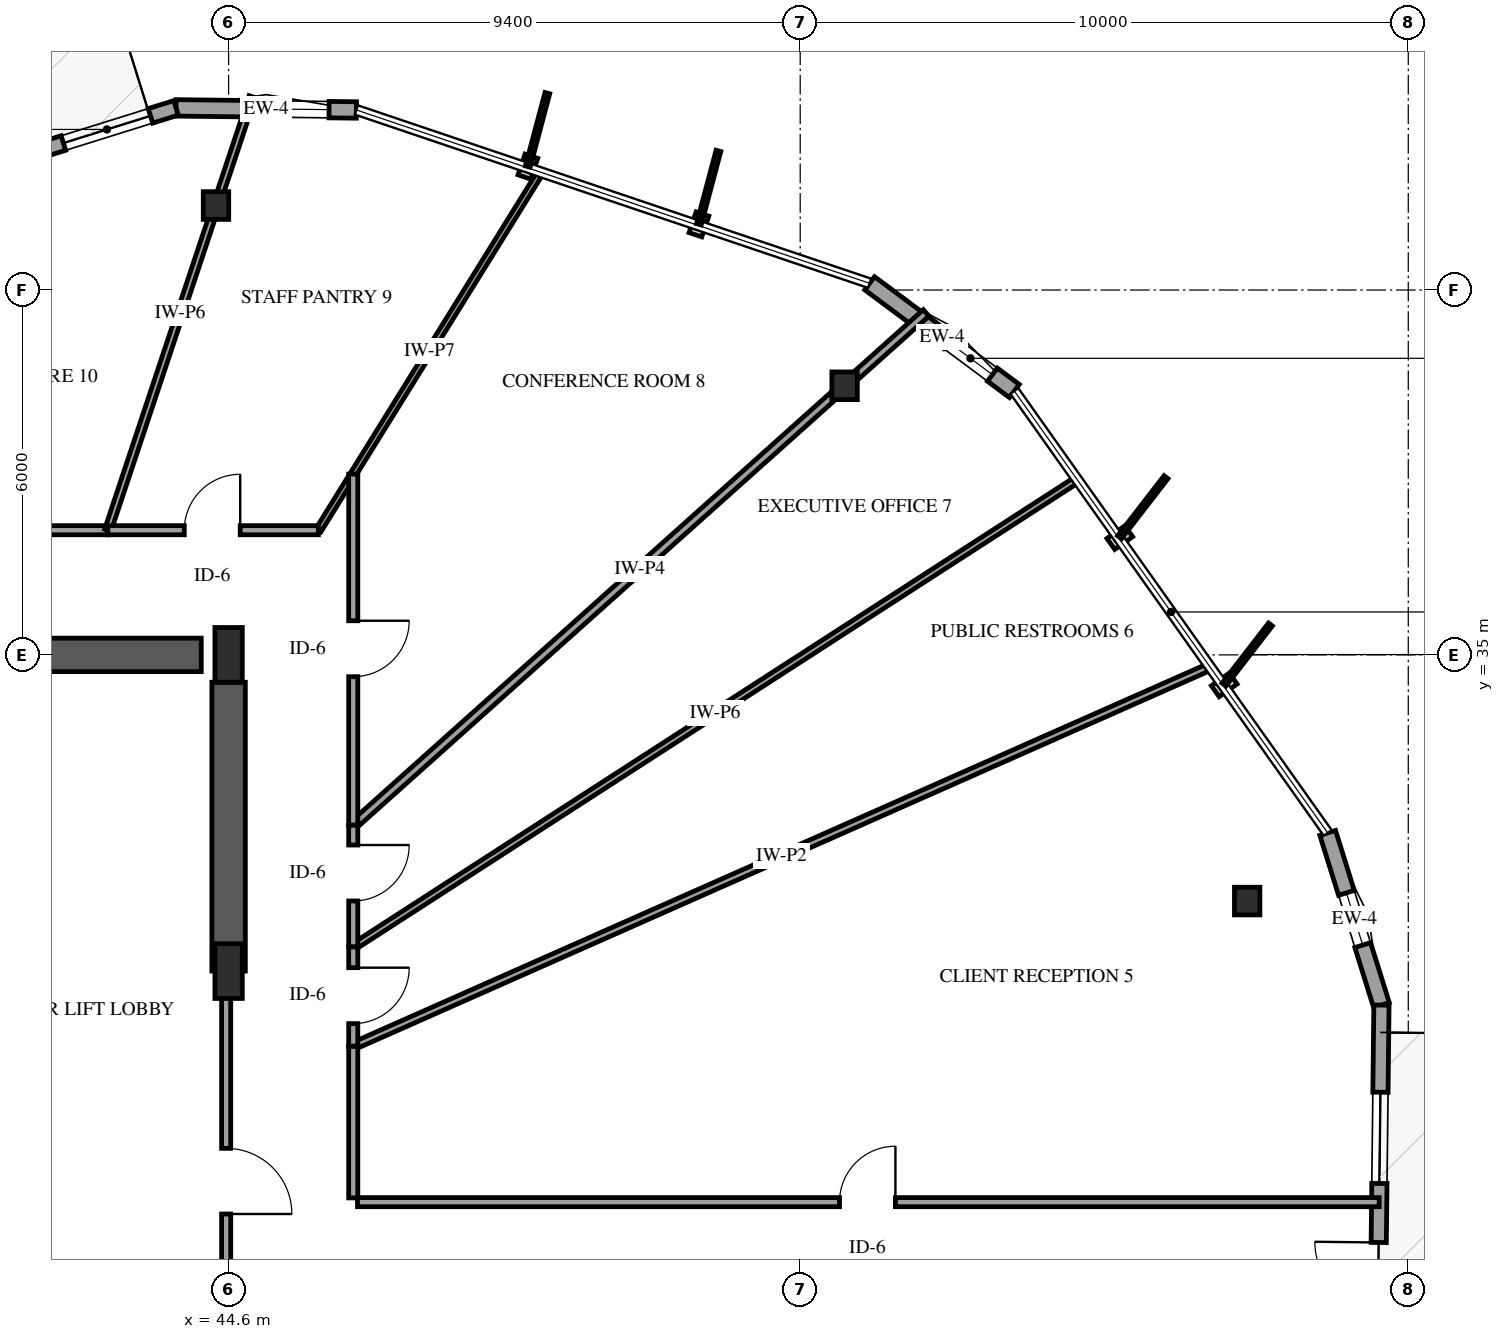
"""IFC4 building model, lengths in metres.
Left out: names, types, materials, properties, quantities, classifications, styles, units other than length and angle.
Written with IfcOpenShell. Run it as: python <this file> out.ifc"""

import sys

from ifc_helpers import new_model, si_unit, direction, frame, frame_2d, origin, origin_2d, place, context, subcontext, project, spatial, rectangle, i_section, extrude, element, fill, save


model = new_model("IFC4")
c1 = context("Model", 3, precision=1e-05, world=origin(), true_north=direction((0.0, 1.0)))
c2 = subcontext(c1, "Body", "Model", "MODEL_VIEW")
j1 = project(units=[si_unit("LENGTHUNIT", "METRE"), si_unit("PLANEANGLEUNIT", "RADIAN")], contexts=[c1])
p1 = place(None, origin())
s1 = spatial("IfcSite", under=j1, at=p1, CompositionType="ELEMENT")
p2 = place(p1, origin())
s2 = spatial("IfcBuilding", under=s1, at=p2, CompositionType="ELEMENT")
p3 = place(p2, frame((0.0, 0.0, 95.2)))
s3 = spatial("IfcBuildingStorey", under=s2, at=p3, CompositionType="ELEMENT", Elevation=95.2)
p4 = place(p3, frame((41.3, 35.0, 0.0), z_axis=(0.0, 0.0, 1.0), x_axis=(1.0, 0.0, 0.0)))
e1 = element("IfcWall", 1, at=p4, inside=s3, PredefinedType="SHEAR", context=c2, shape_type="SweptSolid", body=[
    extrude(rectangle(XDim=2.85, YDim=0.55, at=frame_2d((1.425, 0.0))), origin(), (0.0, 0.0, 1.0), 3.9),
])
p5 = place(p3, frame((44.6, 29.8, 0.0), z_axis=(0.0, 0.0, 1.0), x_axis=(0.0, 1.0, 0.0)))
e2 = element("IfcWall", 2, at=p5, inside=s3, PredefinedType="SHEAR", context=c2, shape_type="SweptSolid", body=[
    extrude(rectangle(XDim=4.75, YDim=0.55, at=frame_2d((2.375, 0.0))), origin(), (0.0, 0.0, 1.0), 3.9),
])
for number, where, z_axis, x_axis in (
    (3, (44.6, 29.8, 0.0), (0.0, 0.0, 1.0), (1.0, 0.0, 0.0)),
    (4, (44.6, 35.0, 0.0), (0.0, 0.0, 1.0), (1.0, 0.0, 0.0)),
):
    element("IfcColumn", number, at=place(p3, frame(where, z_axis=z_axis, x_axis=x_axis)), inside=s3, PredefinedType="PILASTER", context=c2, shape_type="SweptSolid", body=[
        extrude(rectangle(XDim=0.45, YDim=0.9, at=origin_2d()), origin(), (0.0, 0.0, 1.0), 3.9),
    ])
for number, where, z_axis, x_axis in (
    (5, (61.351, 30.951, 0.0), (0.0, 0.0, 1.0), (1.0, 0.0, 0.0)),
    (6, (54.73, 39.425, 0.0), (0.0, 0.0, 1.0), (1.0, 0.0, 0.0)),
    (7, (44.393, 42.389, 0.0), (0.0, 0.0, 1.0), (1.0, 0.0, 0.0)),
):
    element("IfcColumn", number, at=place(p3, frame(where, z_axis=z_axis, x_axis=x_axis)), inside=s3, PredefinedType="COLUMN", context=c2, shape_type="SweptSolid", body=[
        extrude(i_section(OverallWidth=0.418, OverallDepth=0.455, WebThickness=0.042, FlangeThickness=0.068, FilletRadius=0.038, at=origin_2d()), origin(), (0.0, 0.0, 1.0), 3.9),
    ])
p6 = place(p3, frame((57.522, 39.34, 0.0), z_axis=(0.0, 0.0, 1.0), x_axis=(-0.802216720069, 0.597032942175, 0.0)))
e8 = element("IfcWall", 8, at=p6, inside=s3, PredefinedType="SOLIDWALL", context=c2, shape_type="SweptSolid", body=[
    extrude(rectangle(XDim=2.966, YDim=0.27, at=frame_2d((1.483, 0.0))), origin(), (0.0, 0.0, 1.0), 2.979),
])
p7 = place(p6, frame((0.45, 0.0, 0.75)))
e9 = element("IfcOpeningElement", 9, at=p7, cuts=e8, PredefinedType="OPENING", context=c2, shape_type="SweptSolid", body=[
    extrude(rectangle(XDim=0.9, YDim=1.5, at=frame_2d((0.45, 0.75))), frame((0.0, 0.145, 0.0), z_axis=(0.0, -1.0, 0.0), x_axis=(1.0, 0.0, 0.0)), (0.0, 0.0, 1.0), 0.29),
])
p8 = place(p3, frame((46.702, 43.961, 0.0), z_axis=(0.0, 0.0, 1.0), x_axis=(-0.99993363199, 0.011520920787, 0.0)))
e10 = element("IfcWall", 10, at=p8, inside=s3, PredefinedType="SOLIDWALL", context=c2, shape_type="SweptSolid", body=[
    extrude(rectangle(XDim=2.967, YDim=0.27, at=frame_2d((1.483, 0.0))), origin(), (0.0, 0.0, 1.0), 2.979),
])
p9 = place(p8, frame((0.45, 0.0, 0.75)))
e11 = element("IfcOpeningElement", 11, at=p9, cuts=e10, PredefinedType="OPENING", context=c2, shape_type="SweptSolid", body=[
    extrude(rectangle(XDim=0.9, YDim=1.5, at=frame_2d((0.45, 0.75))), frame((0.0, 0.145, 0.0), z_axis=(0.0, -1.0, 0.0), x_axis=(1.0, 0.0, 0.0)), (0.0, 0.0, 1.0), 0.29),
])
p10 = place(p3, frame((43.735, 43.995, 0.0), z_axis=(0.0, 0.0, 1.0), x_axis=(-0.954555531523, -0.298033114332, 0.0)))
e12 = element("IfcWall", 12, at=p10, inside=s3, PredefinedType="SOLIDWALL", context=c2, shape_type="SweptSolid", body=[
    extrude(rectangle(XDim=8.908, YDim=0.25, at=frame_2d((4.454, 0.0))), origin(), (0.0, 0.0, 1.0), 2.979),
])
p11 = place(p10, frame((3.954, 0.0, 0.0)))
e13 = element("IfcOpeningElement", 13, at=p11, cuts=e12, PredefinedType="OPENING", context=c2, shape_type="SweptSolid", body=[
    extrude(rectangle(XDim=1.05, YDim=2.15, at=frame_2d((0.525, 1.075))), frame((0.0, 0.135, 0.0), z_axis=(0.0, -1.0, 0.0), x_axis=(1.0, 0.0, 0.0)), (0.0, 0.0, 1.0), 0.27),
])
p12 = place(p10, frame((0.44, 0.0, 0.72)))
e14 = element("IfcOpeningElement", 14, at=p12, cuts=e12, PredefinedType="OPENING", context=c2, shape_type="SweptSolid", body=[
    extrude(rectangle(XDim=1.5, YDim=1.7, at=frame_2d((0.75, 0.85))), frame((0.0, 0.135, 0.0), z_axis=(0.0, -1.0, 0.0), x_axis=(1.0, 0.0, 0.0)), (0.0, 0.0, 1.0), 0.27),
])
p13 = place(p10, frame((5.644, 0.0, 0.72)))
e15 = element("IfcOpeningElement", 15, at=p13, cuts=e12, PredefinedType="OPENING", context=c2, shape_type="SweptSolid", body=[
    extrude(rectangle(XDim=1.5, YDim=1.7, at=frame_2d((0.75, 0.85))), frame((0.0, 0.135, 0.0), z_axis=(0.0, -1.0, 0.0), x_axis=(1.0, 0.0, 0.0)), (0.0, 0.0, 1.0), 0.27),
])
p14 = place(p3, frame((63.559, 29.241, 0.0), z_axis=(0.0, 0.0, 1.0), x_axis=(-0.297998508568, 0.954566335511, 0.0)))
e16 = element("IfcWall", 16, at=p14, inside=s3, PredefinedType="SOLIDWALL", context=c2, shape_type="SweptSolid", body=[
    extrude(rectangle(XDim=2.967, YDim=0.27, at=frame_2d((1.483, 0.0))), origin(), (0.0, 0.0, 1.0), 2.979),
])
p15 = place(p14, frame((1.033, 0.0, 0.75)))
e17 = element("IfcOpeningElement", 17, at=p15, cuts=e16, PredefinedType="OPENING", context=c2, shape_type="SweptSolid", body=[
    extrude(rectangle(XDim=0.9, YDim=1.5, at=frame_2d((0.45, 0.75))), frame((0.0, 0.145, 0.0), z_axis=(0.0, -1.0, 0.0), x_axis=(1.0, 0.0, 0.0)), (0.0, 0.0, 1.0), 0.29),
])
p16 = place(p3, frame((63.456, 20.333, 0.0), z_axis=(0.0, 0.0, 1.0), x_axis=(0.011510186569, 0.999933755608, 0.0)))
e18 = element("IfcWall", 18, at=p16, inside=s3, PredefinedType="SOLIDWALL", context=c2, shape_type="SweptSolid", body=[
    extrude(rectangle(XDim=8.908, YDim=0.25, at=frame_2d((4.454, 0.0))), origin(), (0.0, 0.0, 1.0), 2.979),
])
p17 = place(p16, frame((3.954, 0.0, 0.0)))
e19 = element("IfcOpeningElement", 19, at=p17, cuts=e18, PredefinedType="OPENING", context=c2, shape_type="SweptSolid", body=[
    extrude(rectangle(XDim=1.05, YDim=2.15, at=frame_2d((0.525, 1.075))), frame((0.0, 0.135, 0.0), z_axis=(0.0, -1.0, 0.0), x_axis=(1.0, 0.0, 0.0)), (0.0, 0.0, 1.0), 0.27),
])
p18 = place(p16, frame((0.44, 0.0, 0.72)))
e20 = element("IfcOpeningElement", 20, at=p18, cuts=e18, PredefinedType="OPENING", context=c2, shape_type="SweptSolid", body=[
    extrude(rectangle(XDim=1.5, YDim=1.7, at=frame_2d((0.75, 0.85))), frame((0.0, 0.135, 0.0), z_axis=(0.0, -1.0, 0.0), x_axis=(1.0, 0.0, 0.0)), (0.0, 0.0, 1.0), 0.27),
])
p19 = place(p16, frame((5.975, 0.0, 0.72)))
e21 = element("IfcOpeningElement", 21, at=p19, cuts=e18, PredefinedType="OPENING", context=c2, shape_type="SweptSolid", body=[
    extrude(rectangle(XDim=1.5, YDim=1.7, at=frame_2d((0.75, 0.85))), frame((0.0, 0.135, 0.0), z_axis=(0.0, -1.0, 0.0), x_axis=(1.0, 0.0, 0.0)), (0.0, 0.0, 1.0), 0.27),
])
p20 = place(p3, frame((46.72, 26.0, 0.0), z_axis=(0.0, 0.0, 1.0), x_axis=(1.0, 0.0, 0.0)))
e22 = element("IfcWall", 22, at=p20, inside=s3, PredefinedType="PARTITIONING", context=c2, shape_type="SweptSolid", body=[
    extrude(rectangle(XDim=16.802, YDim=0.15, at=frame_2d((8.401, 0.0))), origin(), (0.0, 0.0, 1.0), 3.6),
])
p21 = place(p20, frame((7.926, 0.0, 0.0)))
e23 = element("IfcOpeningElement", 23, at=p21, cuts=e22, PredefinedType="OPENING", context=c2, shape_type="SweptSolid", body=[
    extrude(rectangle(XDim=0.92, YDim=2.12, at=frame_2d((0.46, 1.06))), frame((0.0, 0.085, 0.0), z_axis=(0.0, -1.0, 0.0), x_axis=(1.0, 0.0, 0.0)), (0.0, 0.0, 1.0), 0.17),
])
p22 = place(p3, frame((46.65, 28.566, 0.0), z_axis=(0.0, 0.0, 1.0), x_axis=(0.91433941556, 0.404948679653, 0.0)))
e24 = element("IfcWall", 24, at=p22, inside=s3, PredefinedType="PARTITIONING", context=c2, shape_type="SweptSolid", body=[
    extrude(rectangle(XDim=15.407, YDim=0.12, at=frame_2d((7.704, 0.0))), origin(), (0.0, 0.0, 1.0), 3.6),
])
p23 = place(p3, frame((46.65, 30.197, 0.0), z_axis=(0.0, 0.0, 1.0), x_axis=(0.840103662717, 0.542425880549, 0.0)))
e25 = element("IfcWall", 25, at=p23, inside=s3, PredefinedType="PARTITIONING", context=c2, shape_type="SweptSolid", body=[
    extrude(rectangle(XDim=14.17, YDim=0.11, at=frame_2d((7.085, 0.0))), origin(), (0.0, 0.0, 1.0), 3.6),
])
p24 = place(p3, frame((46.65, 32.199, 0.0), z_axis=(0.0, 0.0, 1.0), x_axis=(0.745414069406, 0.666601729019, 0.0)))
e26 = element("IfcWall", 26, at=p24, inside=s3, PredefinedType="PARTITIONING", context=c2, shape_type="SweptSolid", body=[
    extrude(rectangle(XDim=12.639, YDim=0.14, at=frame_2d((6.319, 0.0))), origin(), (0.0, 0.0, 1.0), 2.978),
])
p25 = place(p3, frame((34.81, 37.05, 0.0), z_axis=(0.0, 0.0, 1.0), x_axis=(1.0, 0.0, 0.0)))
e27 = element("IfcWall", 27, at=p25, inside=s3, PredefinedType="PARTITIONING", context=c2, shape_type="SweptSolid", body=[
    extrude(rectangle(XDim=7.804, YDim=0.15, at=frame_2d((3.902, 0.0))), origin(), (0.0, 0.0, 1.0), 3.6),
])
p26 = place(p25, frame((3.427, 0.0, 0.0)))
e28 = element("IfcOpeningElement", 28, at=p26, cuts=e27, PredefinedType="OPENING", context=c2, shape_type="SweptSolid", body=[
    extrude(rectangle(XDim=0.92, YDim=2.12, at=frame_2d((0.46, 1.06))), frame((0.0, 0.085, 0.0), z_axis=(0.0, -1.0, 0.0), x_axis=(1.0, 0.0, 0.0)), (0.0, 0.0, 1.0), 0.17),
])
p27 = place(p3, frame((42.614, 37.05, 0.0), z_axis=(0.0, 0.0, 1.0), x_axis=(0.316071805261, 0.948735270726, 0.0)))
e29 = element("IfcWall", 29, at=p27, inside=s3, PredefinedType="PARTITIONING", context=c2, shape_type="SweptSolid", body=[
    extrude(rectangle(XDim=7.514, YDim=0.11, at=frame_2d((3.757, 0.0))), origin(), (0.0, 0.0, 1.0), 2.895),
])
p28 = place(p3, frame((46.077, 37.05, 0.0), z_axis=(0.0, 0.0, 1.0), x_axis=(0.527307609439, 0.849674458265, 0.0)))
e30 = element("IfcWall", 30, at=p28, inside=s3, PredefinedType="PARTITIONING", context=c2, shape_type="SweptSolid", body=[
    extrude(rectangle(XDim=6.93, YDim=0.1, at=frame_2d((3.465, 0.0))), origin(), (0.0, 0.0, 1.0), 3.6),
])
p29 = place(p3, frame((44.56, 29.8, 0.0), z_axis=(0.0, 0.0, 1.0), x_axis=(0.0, -1.0, 0.0)))
e31 = element("IfcWall", 31, at=p29, inside=s3, PredefinedType="PARTITIONING", context=c2, shape_type="SweptSolid", body=[
    extrude(rectangle(XDim=6.91, YDim=0.15, at=frame_2d((3.455, 0.0))), origin(), (0.0, 0.0, 1.0), 2.64),
])
p30 = place(p29, frame((2.915, 0.0, 0.0)))
e32 = element("IfcOpeningElement", 32, at=p30, cuts=e31, PredefinedType="OPENING", context=c2, shape_type="SweptSolid", body=[
    extrude(rectangle(XDim=1.08, YDim=2.15, at=frame_2d((0.54, 1.075))), frame((0.0, 0.085, 0.0), z_axis=(0.0, -1.0, 0.0), x_axis=(1.0, 0.0, 0.0)), (0.0, 0.0, 1.0), 0.17),
])
p31 = place(p3, frame((46.65, 37.973, 0.0), z_axis=(0.0, 0.0, 1.0), x_axis=(0.0, -1.0, 0.0)))
e33 = element("IfcWall", 33, at=p31, inside=s3, PredefinedType="PARTITIONING", context=c2, shape_type="SweptSolid", body=[
    extrude(rectangle(XDim=5.774, YDim=0.15, at=frame_2d((2.887, 0.0))), origin(), (0.0, 0.0, 1.0), 3.6),
])
p32 = place(p31, frame((2.412, 0.0, 0.0)))
e34 = element("IfcOpeningElement", 34, at=p32, cuts=e33, PredefinedType="OPENING", context=c2, shape_type="SweptSolid", body=[
    extrude(rectangle(XDim=0.92, YDim=2.12, at=frame_2d((0.46, 1.06))), frame((0.0, 0.085, 0.0), z_axis=(0.0, -1.0, 0.0), x_axis=(1.0, 0.0, 0.0)), (0.0, 0.0, 1.0), 0.17),
])
p33 = place(p3, frame((42.614, 37.05, 0.0), z_axis=(0.0, 0.0, 1.0), x_axis=(1.0, 0.0, 0.0)))
e35 = element("IfcWall", 35, at=p33, inside=s3, PredefinedType="PARTITIONING", context=c2, shape_type="SweptSolid", body=[
    extrude(rectangle(XDim=3.463, YDim=0.15, at=frame_2d((1.731, 0.0))), origin(), (0.0, 0.0, 1.0), 3.6),
])
p34 = place(p33, frame((1.257, 0.0, 0.0)))
e36 = element("IfcOpeningElement", 36, at=p34, cuts=e35, PredefinedType="OPENING", context=c2, shape_type="SweptSolid", body=[
    extrude(rectangle(XDim=0.92, YDim=2.12, at=frame_2d((0.46, 1.06))), frame((0.0, 0.085, 0.0), z_axis=(0.0, -1.0, 0.0), x_axis=(1.0, 0.0, 0.0)), (0.0, 0.0, 1.0), 0.17),
])
p35 = place(p3, frame((46.65, 28.566, 0.0), z_axis=(0.0, 0.0, 1.0), x_axis=(0.0, -1.0, 0.0)))
e37 = element("IfcWall", 37, at=p35, inside=s3, PredefinedType="PARTITIONING", context=c2, shape_type="SweptSolid", body=[
    extrude(rectangle(XDim=2.496, YDim=0.15, at=frame_2d((1.248, 0.0))), origin(), (0.0, 0.0, 1.0), 3.6),
])
p36 = place(p3, frame((46.65, 32.199, 0.0), z_axis=(0.0, 0.0, 1.0), x_axis=(0.0, -1.0, 0.0)))
e38 = element("IfcWall", 38, at=p36, inside=s3, PredefinedType="PARTITIONING", context=c2, shape_type="SweptSolid", body=[
    extrude(rectangle(XDim=2.002, YDim=0.15, at=frame_2d((1.001, 0.0))), origin(), (0.0, 0.0, 1.0), 3.6),
])
p37 = place(p36, frame((0.326, 0.0, 0.0)))
e39 = element("IfcOpeningElement", 39, at=p37, cuts=e38, PredefinedType="OPENING", context=c2, shape_type="SweptSolid", body=[
    extrude(rectangle(XDim=0.92, YDim=2.12, at=frame_2d((0.46, 1.06))), frame((0.0, 0.085, 0.0), z_axis=(0.0, -1.0, 0.0), x_axis=(1.0, 0.0, 0.0)), (0.0, 0.0, 1.0), 0.17),
])
p38 = place(p3, frame((46.65, 30.197, 0.0), z_axis=(0.0, 0.0, 1.0), x_axis=(0.0, -1.0, 0.0)))
e40 = element("IfcWall", 40, at=p38, inside=s3, PredefinedType="PARTITIONING", context=c2, shape_type="SweptSolid", body=[
    extrude(rectangle(XDim=1.631, YDim=0.15, at=frame_2d((0.815, 0.0))), origin(), (0.0, 0.0, 1.0), 3.6),
])
p39 = place(p38, frame((0.341, 0.0, 0.0)))
e41 = element("IfcOpeningElement", 41, at=p39, cuts=e40, PredefinedType="OPENING", context=c2, shape_type="SweptSolid", body=[
    extrude(rectangle(XDim=0.92, YDim=2.12, at=frame_2d((0.46, 1.06))), frame((0.0, 0.085, 0.0), z_axis=(0.0, -1.0, 0.0), x_axis=(1.0, 0.0, 0.0)), (0.0, 0.0, 1.0), 0.17),
])
p40 = place(p7, origin())
e42 = element("IfcWindow", 42, at=p40, inside=s3, PartitioningType="SINGLE_PANEL", PredefinedType="WINDOW", context=c2, shape_type="SweptSolid", body=[
    extrude(rectangle(XDim=0.9, YDim=1.5, at=frame_2d((0.45, 0.75))), frame((0.0, 0.03, 0.0), z_axis=(0.0, -1.0, 0.0), x_axis=(1.0, 0.0, 0.0)), (0.0, 0.0, 1.0), 0.06),
])
fill(e9, e42)
p41 = place(p9, origin())
e43 = element("IfcWindow", 43, at=p41, inside=s3, PartitioningType="SINGLE_PANEL", PredefinedType="WINDOW", context=c2, shape_type="SweptSolid", body=[
    extrude(rectangle(XDim=0.9, YDim=1.5, at=frame_2d((0.45, 0.75))), frame((0.0, 0.03, 0.0), z_axis=(0.0, -1.0, 0.0), x_axis=(1.0, 0.0, 0.0)), (0.0, 0.0, 1.0), 0.06),
])
fill(e11, e43)
p42 = place(p12, origin())
e44 = element("IfcWindow", 44, at=p42, inside=s3, PartitioningType="SINGLE_PANEL", PredefinedType="WINDOW", context=c2, shape_type="SweptSolid", body=[
    extrude(rectangle(XDim=1.5, YDim=1.7, at=frame_2d((0.75, 0.85))), frame((0.0, 0.03, 0.0), z_axis=(0.0, -1.0, 0.0), x_axis=(1.0, 0.0, 0.0)), (0.0, 0.0, 1.0), 0.06),
])
fill(e14, e44)
p43 = place(p15, origin())
e45 = element("IfcWindow", 45, at=p43, inside=s3, PartitioningType="SINGLE_PANEL", PredefinedType="WINDOW", context=c2, shape_type="SweptSolid", body=[
    extrude(rectangle(XDim=0.9, YDim=1.5, at=frame_2d((0.45, 0.75))), frame((0.0, 0.03, 0.0), z_axis=(0.0, -1.0, 0.0), x_axis=(1.0, 0.0, 0.0)), (0.0, 0.0, 1.0), 0.06),
])
fill(e17, e45)
p44 = place(p17, origin())
e46 = element("IfcDoor", 46, at=p44, inside=s3, OperationType="SINGLE_SWING_RIGHT", PredefinedType="DOOR", context=c2, shape_type="SweptSolid", body=[
    extrude(rectangle(XDim=1.05, YDim=2.15, at=frame_2d((0.525, 1.075))), frame((0.0, 0.025, 0.0), z_axis=(0.0, -1.0, 0.0), x_axis=(1.0, 0.0, 0.0)), (0.0, 0.0, 1.0), 0.05),
])
fill(e19, e46)
p45 = place(p19, origin())
e47 = element("IfcWindow", 47, at=p45, inside=s3, PartitioningType="SINGLE_PANEL", PredefinedType="WINDOW", context=c2, shape_type="SweptSolid", body=[
    extrude(rectangle(XDim=1.5, YDim=1.7, at=frame_2d((0.75, 0.85))), frame((0.0, 0.03, 0.0), z_axis=(0.0, -1.0, 0.0), x_axis=(1.0, 0.0, 0.0)), (0.0, 0.0, 1.0), 0.06),
])
fill(e21, e47)
p46 = place(p21, origin())
e48 = element("IfcDoor", 48, at=p46, inside=s3, OperationType="SINGLE_SWING_RIGHT", PredefinedType="DOOR", context=c2, shape_type="SweptSolid", body=[
    extrude(rectangle(XDim=0.92, YDim=2.12, at=frame_2d((0.46, 1.06))), frame((0.0, 0.025, 0.0), z_axis=(0.0, -1.0, 0.0), x_axis=(1.0, 0.0, 0.0)), (0.0, 0.0, 1.0), 0.05),
])
fill(e23, e48)
p47 = place(p30, origin())
e49 = element("IfcDoor", 49, at=p47, inside=s3, OperationType="SINGLE_SWING_RIGHT", PredefinedType="DOOR", context=c2, shape_type="SweptSolid", body=[
    extrude(rectangle(XDim=1.08, YDim=2.15, at=frame_2d((0.54, 1.075))), frame((0.0, 0.025, 0.0), z_axis=(0.0, -1.0, 0.0), x_axis=(1.0, 0.0, 0.0)), (0.0, 0.0, 1.0), 0.05),
])
fill(e32, e49)
p48 = place(p32, origin())
e50 = element("IfcDoor", 50, at=p48, inside=s3, OperationType="SINGLE_SWING_LEFT", PredefinedType="DOOR", context=c2, shape_type="SweptSolid", body=[
    extrude(rectangle(XDim=0.92, YDim=2.12, at=frame_2d((0.46, 1.06))), frame((0.0, 0.025, 0.0), z_axis=(0.0, -1.0, 0.0), x_axis=(1.0, 0.0, 0.0)), (0.0, 0.0, 1.0), 0.05),
])
fill(e34, e50)
p49 = place(p34, origin())
e51 = element("IfcDoor", 51, at=p49, inside=s3, OperationType="SINGLE_SWING_RIGHT", PredefinedType="DOOR", context=c2, shape_type="SweptSolid", body=[
    extrude(rectangle(XDim=0.92, YDim=2.12, at=frame_2d((0.46, 1.06))), frame((0.0, 0.025, 0.0), z_axis=(0.0, -1.0, 0.0), x_axis=(1.0, 0.0, 0.0)), (0.0, 0.0, 1.0), 0.05),
])
fill(e36, e51)
p50 = place(p37, origin())
e52 = element("IfcDoor", 52, at=p50, inside=s3, OperationType="SINGLE_SWING_LEFT", PredefinedType="DOOR", context=c2, shape_type="SweptSolid", body=[
    extrude(rectangle(XDim=0.92, YDim=2.12, at=frame_2d((0.46, 1.06))), frame((0.0, 0.025, 0.0), z_axis=(0.0, -1.0, 0.0), x_axis=(1.0, 0.0, 0.0)), (0.0, 0.0, 1.0), 0.05),
])
fill(e39, e52)
p51 = place(p39, origin())
e53 = element("IfcDoor", 53, at=p51, inside=s3, OperationType="SINGLE_SWING_LEFT", PredefinedType="DOOR", context=c2, shape_type="SweptSolid", body=[
    extrude(rectangle(XDim=0.92, YDim=2.12, at=frame_2d((0.46, 1.06))), frame((0.0, 0.025, 0.0), z_axis=(0.0, -1.0, 0.0), x_axis=(1.0, 0.0, 0.0)), (0.0, 0.0, 1.0), 0.05),
])
fill(e41, e53)
save(model, sys.argv[1])
